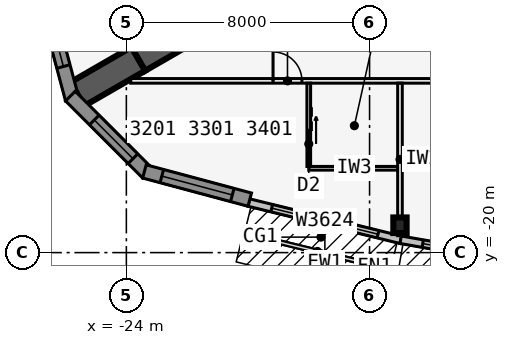
"""IFC4 building model, lengths in metres.
Left out: names, types, materials, properties, quantities, classifications, styles, units other than length and angle.
Written with IfcOpenShell. Run it as: python <this file> out.ifc"""

import sys

from ifc_helpers import new_model, si_unit, direction, frame, frame_2d, origin, origin_2d, place, context, subcontext, project, spatial, polyline, rectangle, i_section, outline, extrude, element, fill, save


model = new_model("IFC4")
c1 = context("Model", 3, precision=1e-05, world=origin(), true_north=direction((0.0, 1.0)))
c2 = subcontext(c1, "Body", "Model", "MODEL_VIEW")
j1 = project(units=[si_unit("LENGTHUNIT", "METRE"), si_unit("PLANEANGLEUNIT", "RADIAN")], contexts=[c1])
p1 = place(None, origin())
s1 = spatial("IfcSite", under=j1, at=p1, CompositionType="ELEMENT")
p2 = place(p1, origin())
s2 = spatial("IfcBuilding", under=s1, at=p2, CompositionType="ELEMENT")
p3 = place(p2, frame((0.0, 0.0, 124.9)))
s3 = spatial("IfcBuildingStorey", under=s2, at=p3, CompositionType="ELEMENT", Elevation=124.9)
for number, where, z_axis, x_axis in (
    (1, (-21.61, -12.477, 0.0), (0.0, 0.0, 1.0), (-0.866, -0.5, 0.0)),
    (2, (-23.61, -13.631, 0.0), (0.0, 0.0, 1.0), (-0.866, -0.5, 0.0)),
):
    element("IfcWall", number, at=place(p3, frame(where, z_axis=z_axis, x_axis=x_axis)), inside=s3, PredefinedType="SHEAR", context=c2, shape_type="SweptSolid", body=[
        extrude(rectangle(XDim=2.309, YDim=0.9, at=frame_2d((1.155, 0.0))), origin(), (0.0, 0.0, 1.0), 3.4),
    ])
p4 = place(p3, frame((-15.0, -19.1, 0.0), z_axis=(0.0, 0.0, 1.0), x_axis=(1.0, 0.0, 0.0)))
e3 = element("IfcColumn", 3, at=p4, inside=s3, PredefinedType="COLUMN", context=c2, shape_type="SweptSolid", body=[
    extrude(i_section(OverallWidth=0.437, OverallDepth=0.513, WebThickness=0.061, FlangeThickness=0.097, at=origin_2d()), origin(), (0.0, 0.0, 1.0), 3.4),
])
p5 = place(p3, frame((-19.97, -18.354, 0.0), z_axis=(0.0, 0.0, 1.0), x_axis=(0.971270024053, -0.237980126011, 0.0)))
e4 = element("IfcWall", 4, at=p5, inside=s3, PredefinedType="STANDARD", context=c2, shape_type="SweptSolid", body=[
    extrude(rectangle(XDim=5.148, YDim=0.25, at=frame_2d((2.574, 0.0))), origin(), (0.0, 0.0, 1.0), 3.235),
])
p6 = place(p5, frame((0.774, 0.0, 0.45)))
e5 = element("IfcOpeningElement", 5, at=p6, cuts=e4, PredefinedType="OPENING", context=c2, shape_type="SweptSolid", body=[
    extrude(rectangle(XDim=3.6, YDim=2.4, at=frame_2d((1.8, 1.2))), frame((0.0, 0.135, 0.0), z_axis=(0.0, -1.0, 0.0), x_axis=(1.0, 0.0, 0.0)), (0.0, 0.0, 1.0), 0.27),
])
p7 = place(p3, frame((-14.979, -19.577, 0.0), z_axis=(0.0, 0.0, 1.0), x_axis=(0.985030467156, -0.172380331752, 0.0)))
e6 = element("IfcWall", 6, at=p7, inside=s3, PredefinedType="STANDARD", context=c2, shape_type="SweptSolid", body=[
    extrude(rectangle(XDim=5.076, YDim=0.25, at=frame_2d((2.538, 0.0))), origin(), (0.0, 0.0, 1.0), 3.235),
])
p8 = place(p7, frame((0.738, 0.0, 0.45)))
e7 = element("IfcOpeningElement", 7, at=p8, cuts=e6, PredefinedType="OPENING", context=c2, shape_type="SweptSolid", body=[
    extrude(rectangle(XDim=3.6, YDim=2.4, at=frame_2d((1.8, 1.2))), frame((0.0, 0.135, 0.0), z_axis=(0.0, -1.0, 0.0), x_axis=(1.0, 0.0, 0.0)), (0.0, 0.0, 1.0), 0.27),
])
p9 = place(p3, frame((-26.711, -11.489, 0.0), z_axis=(0.0, 0.0, 1.0), x_axis=(0.258823421857, -0.965924653531, 0.0)))
e8 = element("IfcWall", 8, at=p9, inside=s3, PredefinedType="SOLIDWALL", context=c2, shape_type="SweptSolid", body=[
    extrude(outline(polyline([(3.586, 0.225), (3.527, 0.225), (3.035, 0.093), (3.0, 0.225), (0.0, 0.225), (0.0, -0.225), (3.586, -0.225), (3.586, 0.225)])), origin(), (0.0, 0.0, 1.0), 3.235),
])
p10 = place(p9, frame((0.675, 0.0, 0.45)))
e9 = element("IfcOpeningElement", 9, at=p10, cuts=e8, PredefinedType="OPENING", context=c2, shape_type="SweptSolid", body=[
    extrude(rectangle(XDim=1.8, YDim=2.4, at=frame_2d((0.9, 1.2))), frame((0.0, 0.235, 0.0), z_axis=(0.0, -1.0, 0.0), x_axis=(1.0, 0.0, 0.0)), (0.0, 0.0, 1.0), 0.47),
])
p11 = place(p3, frame((-25.841, -14.852, 0.0), z_axis=(0.0, 0.0, 1.0), x_axis=(0.707106781187, -0.707106781187, 0.0)))
e10 = element("IfcWall", 10, at=p11, inside=s3, PredefinedType="SOLIDWALL", context=c2, shape_type="SweptSolid", body=[
    extrude(outline(polyline([(3.586, 0.225), (0.586, 0.225), (0.551, 0.093), (0.059, 0.225), (0.0, 0.225), (0.0, -0.225), (3.586, -0.225), (3.586, 0.225)])), origin(), (0.0, 0.0, 1.0), 3.235),
])
p12 = place(p11, frame((1.111, 0.0, 0.45)))
e11 = element("IfcOpeningElement", 11, at=p12, cuts=e10, PredefinedType="OPENING", context=c2, shape_type="SweptSolid", body=[
    extrude(rectangle(XDim=1.8, YDim=2.4, at=frame_2d((0.9, 1.2))), frame((0.0, 0.235, 0.0), z_axis=(0.0, -1.0, 0.0), x_axis=(1.0, 0.0, 0.0)), (0.0, 0.0, 1.0), 0.47),
])
p13 = place(p3, frame((-23.406, -17.33, 0.0), z_axis=(0.0, 0.0, 1.0), x_axis=(0.965924653531, -0.258823421857, 0.0)))
e12 = element("IfcWall", 12, at=p13, inside=s3, PredefinedType="SOLIDWALL", context=c2, shape_type="SweptSolid", body=[
    extrude(rectangle(XDim=3.586, YDim=0.45, at=frame_2d((1.793, 0.0))), origin(), (0.0, 0.0, 1.0), 3.235),
])
p14 = place(p13, frame((0.593, 0.0, 0.45)))
e13 = element("IfcOpeningElement", 13, at=p14, cuts=e12, PredefinedType="OPENING", context=c2, shape_type="SweptSolid", body=[
    extrude(rectangle(XDim=2.4, YDim=2.4, at=frame_2d((1.2, 1.2))), frame((0.0, 0.235, 0.0), z_axis=(0.0, -1.0, 0.0), x_axis=(1.0, 0.0, 0.0)), (0.0, 0.0, 1.0), 0.47),
])
p15 = place(p3, frame((-23.857, -14.351, 0.0), z_axis=(0.0, 0.0, 1.0), x_axis=(1.0, 0.0, 0.0)))
e14 = element("IfcWall", 14, at=p15, inside=s3, PredefinedType="PARTITIONING", context=c2, shape_type="SweptSolid", body=[
    extrude(rectangle(XDim=47.714, YDim=0.15, at=frame_2d((23.857, 0.0))), origin(), (0.0, 0.0, 1.0), 3.235),
])
p16 = place(p15, frame((4.682, 0.0, 0.0)))
e15 = element("IfcOpeningElement", 15, at=p16, cuts=e14, PredefinedType="OPENING", context=c2, shape_type="SweptSolid", body=[
    extrude(rectangle(XDim=0.95, YDim=2.13, at=frame_2d((0.475, 1.065))), frame((0.0, 0.085, 0.0), z_axis=(0.0, -1.0, 0.0), x_axis=(1.0, 0.0, 0.0)), (0.0, 0.0, 1.0), 0.17),
])
p17 = place(p15, frame((14.682, 0.0, 0.0)))
e16 = element("IfcOpeningElement", 16, at=p17, cuts=e14, PredefinedType="OPENING", context=c2, shape_type="SweptSolid", body=[
    extrude(rectangle(XDim=0.95, YDim=2.13, at=frame_2d((0.475, 1.065))), frame((0.0, 0.085, 0.0), z_axis=(0.0, -1.0, 0.0), x_axis=(1.0, 0.0, 0.0)), (0.0, 0.0, 1.0), 0.17),
])
p18 = place(p15, frame((21.482, 0.0, 0.0)))
e17 = element("IfcOpeningElement", 17, at=p18, cuts=e14, PredefinedType="OPENING", context=c2, shape_type="SweptSolid", body=[
    extrude(rectangle(XDim=0.95, YDim=2.13, at=frame_2d((0.475, 1.065))), frame((0.0, 0.085, 0.0), z_axis=(0.0, -1.0, 0.0), x_axis=(1.0, 0.0, 0.0)), (0.0, 0.0, 1.0), 0.17),
])
p19 = place(p15, frame((25.857, 0.0, 0.0)))
e18 = element("IfcOpeningElement", 18, at=p19, cuts=e14, PredefinedType="OPENING", context=c2, shape_type="SweptSolid", body=[
    extrude(rectangle(XDim=1.0, YDim=2.13, at=frame_2d((0.5, 1.065))), frame((0.0, 0.085, 0.0), z_axis=(0.0, -1.0, 0.0), x_axis=(1.0, 0.0, 0.0)), (0.0, 0.0, 1.0), 0.17),
])
p20 = place(p15, frame((30.282, 0.0, 0.0)))
e19 = element("IfcOpeningElement", 19, at=p20, cuts=e14, PredefinedType="OPENING", context=c2, shape_type="SweptSolid", body=[
    extrude(rectangle(XDim=0.95, YDim=2.13, at=frame_2d((0.475, 1.065))), frame((0.0, 0.085, 0.0), z_axis=(0.0, -1.0, 0.0), x_axis=(1.0, 0.0, 0.0)), (0.0, 0.0, 1.0), 0.17),
])
p21 = place(p15, frame((43.041, 0.0, 0.0)))
e20 = element("IfcOpeningElement", 20, at=p21, cuts=e14, PredefinedType="OPENING", context=c2, shape_type="SweptSolid", body=[
    extrude(rectangle(XDim=0.95, YDim=2.13, at=frame_2d((0.475, 1.065))), frame((0.0, 0.085, 0.0), z_axis=(0.0, -1.0, 0.0), x_axis=(1.0, 0.0, 0.0)), (0.0, 0.0, 1.0), 0.17),
])
p22 = place(p3, frame((-15.0, -14.426, 0.0), z_axis=(0.0, 0.0, 1.0), x_axis=(0.0, -1.0, 0.0)))
e21 = element("IfcWall", 21, at=p22, inside=s3, PredefinedType="PARTITIONING", context=c2, shape_type="SweptSolid", body=[
    extrude(rectangle(XDim=5.017, YDim=0.15, at=frame_2d((2.508, 0.0))), origin(), (0.0, 0.0, 1.0), 2.389),
])
p23 = place(p3, frame((-18.0, -17.226, 0.0), z_axis=(0.0, 0.0, 1.0), x_axis=(1.0, 0.0, 0.0)))
e22 = element("IfcWall", 22, at=p23, inside=s3, PredefinedType="PLUMBINGWALL", context=c2, shape_type="SweptSolid", body=[
    extrude(rectangle(XDim=3.0, YDim=0.12, at=frame_2d((1.5, 0.0))), origin(), (0.0, 0.0, 1.0), 3.235),
])
p24 = place(p3, frame((-18.0, -14.426, 0.0), z_axis=(0.0, 0.0, 1.0), x_axis=(0.0, -1.0, 0.0)))
e23 = element("IfcWall", 23, at=p24, inside=s3, PredefinedType="PLUMBINGWALL", context=c2, shape_type="SweptSolid", body=[
    extrude(rectangle(XDim=2.74, YDim=0.12, at=frame_2d((1.37, 0.0))), origin(), (0.0, 0.0, 1.0), 3.235),
])
p25 = place(p24, frame((1.55, 0.0, 0.0)))
e24 = element("IfcOpeningElement", 24, at=p25, cuts=e23, PredefinedType="OPENING", context=c2, shape_type="SweptSolid", body=[
    extrude(rectangle(XDim=0.9, YDim=2.13, at=frame_2d((0.45, 1.065))), frame((0.0, 0.07, 0.0), z_axis=(0.0, -1.0, 0.0), x_axis=(1.0, 0.0, 0.0)), (0.0, 0.0, 1.0), 0.14),
])
p26 = place(p6, origin())
e25 = element("IfcWindow", 25, at=p26, inside=s3, PartitioningType="SINGLE_PANEL", PredefinedType="WINDOW", context=c2, shape_type="SweptSolid", body=[
    extrude(rectangle(XDim=3.6, YDim=2.4, at=frame_2d((1.8, 1.2))), frame((0.0, 0.03, 0.0), z_axis=(0.0, -1.0, 0.0), x_axis=(1.0, 0.0, 0.0)), (0.0, 0.0, 1.0), 0.06),
])
fill(e5, e25)
p27 = place(p8, origin())
e26 = element("IfcWindow", 26, at=p27, inside=s3, PartitioningType="SINGLE_PANEL", PredefinedType="WINDOW", context=c2, shape_type="SweptSolid", body=[
    extrude(rectangle(XDim=3.6, YDim=2.4, at=frame_2d((1.8, 1.2))), frame((0.0, 0.03, 0.0), z_axis=(0.0, -1.0, 0.0), x_axis=(1.0, 0.0, 0.0)), (0.0, 0.0, 1.0), 0.06),
])
fill(e7, e26)
p28 = place(p10, origin())
e27 = element("IfcWindow", 27, at=p28, inside=s3, PartitioningType="SINGLE_PANEL", PredefinedType="WINDOW", context=c2, shape_type="SweptSolid", body=[
    extrude(rectangle(XDim=1.8, YDim=2.4, at=frame_2d((0.9, 1.2))), frame((0.0, 0.03, 0.0), z_axis=(0.0, -1.0, 0.0), x_axis=(1.0, 0.0, 0.0)), (0.0, 0.0, 1.0), 0.06),
])
fill(e9, e27)
p29 = place(p12, origin())
e28 = element("IfcWindow", 28, at=p29, inside=s3, PartitioningType="SINGLE_PANEL", PredefinedType="WINDOW", context=c2, shape_type="SweptSolid", body=[
    extrude(rectangle(XDim=1.8, YDim=2.4, at=frame_2d((0.9, 1.2))), frame((0.0, 0.03, 0.0), z_axis=(0.0, -1.0, 0.0), x_axis=(1.0, 0.0, 0.0)), (0.0, 0.0, 1.0), 0.06),
])
fill(e11, e28)
p30 = place(p14, origin())
e29 = element("IfcWindow", 29, at=p30, inside=s3, PartitioningType="SINGLE_PANEL", PredefinedType="WINDOW", context=c2, shape_type="SweptSolid", body=[
    extrude(rectangle(XDim=2.4, YDim=2.4, at=frame_2d((1.2, 1.2))), frame((0.0, 0.03, 0.0), z_axis=(0.0, -1.0, 0.0), x_axis=(1.0, 0.0, 0.0)), (0.0, 0.0, 1.0), 0.06),
])
fill(e13, e29)
p31 = place(p25, origin())
e30 = element("IfcDoor", 30, at=p31, inside=s3, OperationType="SLIDING_TO_LEFT", PredefinedType="DOOR", context=c2, shape_type="SweptSolid", body=[
    extrude(rectangle(XDim=0.9, YDim=2.13, at=frame_2d((0.45, 1.065))), frame((0.0, 0.025, 0.0), z_axis=(0.0, -1.0, 0.0), x_axis=(1.0, 0.0, 0.0)), (0.0, 0.0, 1.0), 0.05),
])
fill(e24, e30)
p32 = place(p16, origin())
e31 = element("IfcDoor", 31, at=p32, inside=s3, OperationType="SINGLE_SWING_LEFT", PredefinedType="DOOR", context=c2, shape_type="SweptSolid", body=[
    extrude(rectangle(XDim=0.95, YDim=2.13, at=frame_2d((0.475, 1.065))), frame((0.0, 0.025, 0.0), z_axis=(0.0, -1.0, 0.0), x_axis=(1.0, 0.0, 0.0)), (0.0, 0.0, 1.0), 0.05),
])
fill(e15, e31)
save(model, sys.argv[1])
